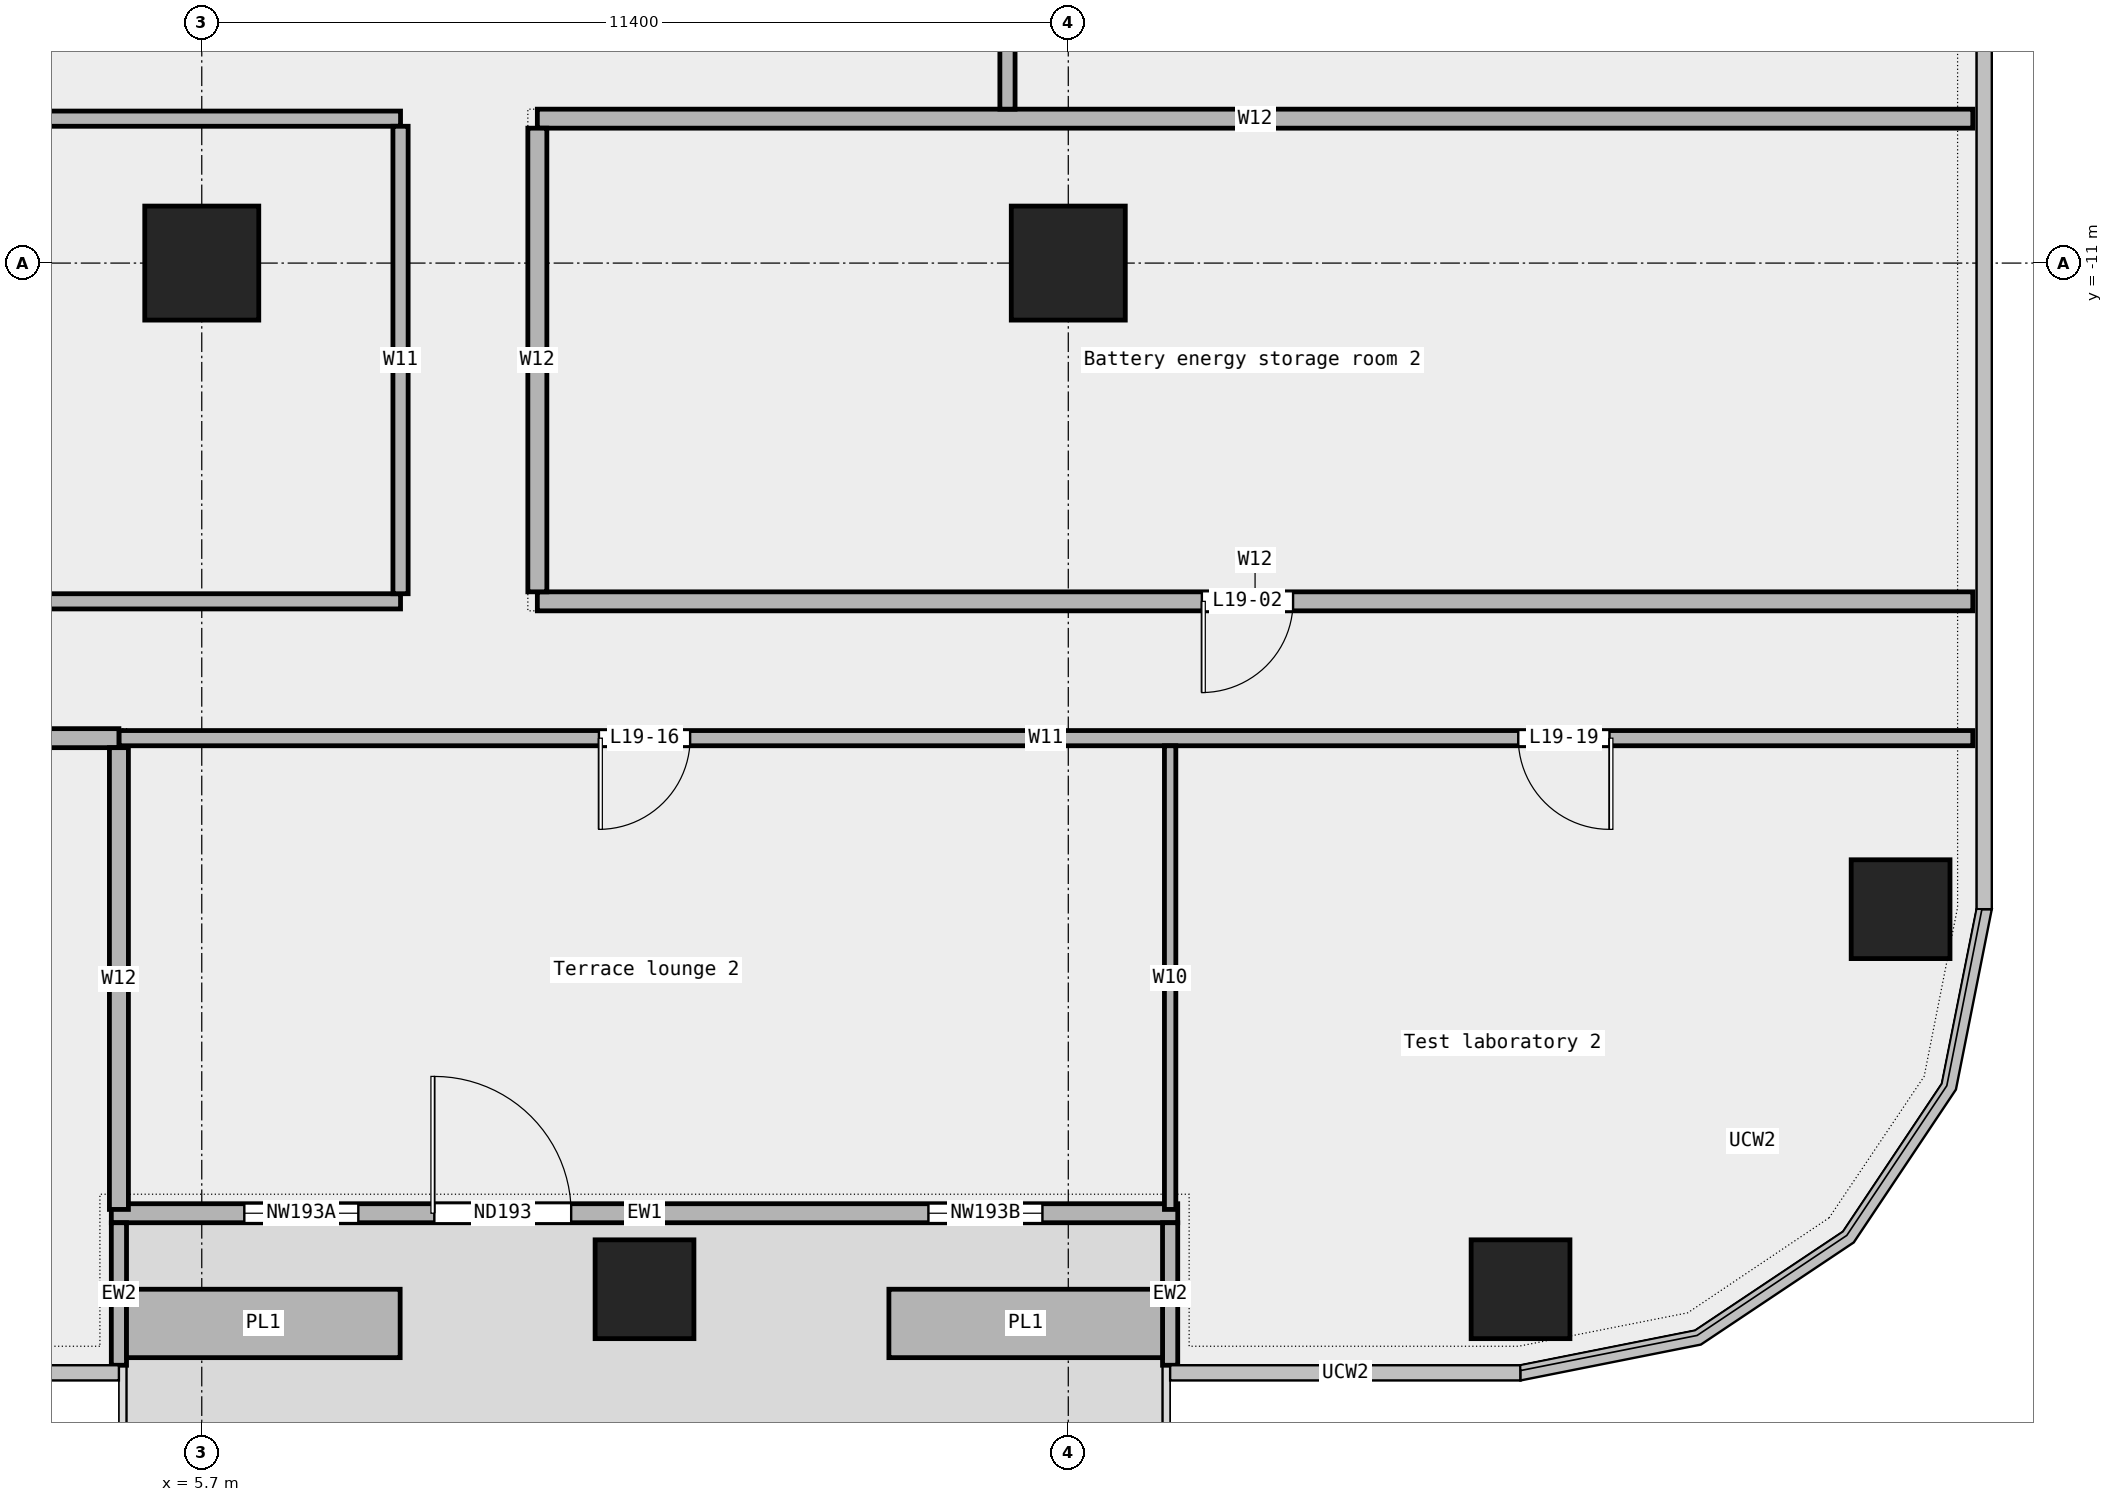
"""IFC4 building model, lengths in metres.
Left out: names, types, materials, properties, quantities, classifications, styles, units other than length and angle.
Written with IfcOpenShell. Run it as: python <this file> out.ifc"""

import sys

from ifc_helpers import new_model, si_unit, direction, frame, frame_2d, origin, origin_2d, place, context, subcontext, project, spatial, rectangle, extrude, element, fill, save


model = new_model("IFC4")
c1 = context("Model", 3, precision=1e-05, world=origin(), true_north=direction((0.0, 1.0)))
c2 = subcontext(c1, "Body", "Model", "MODEL_VIEW")
j1 = project(units=[si_unit("LENGTHUNIT", "METRE"), si_unit("PLANEANGLEUNIT", "RADIAN")], contexts=[c1])
p1 = place(None, origin())
s1 = spatial("IfcSite", under=j1, at=p1, CompositionType="ELEMENT")
p2 = place(p1, origin())
s2 = spatial("IfcBuilding", under=s1, at=p2, CompositionType="ELEMENT")
p3 = place(p2, frame((0.0, 0.0, 99.1)))
s3 = spatial("IfcBuildingStorey", under=s2, at=p3, CompositionType="ELEMENT", Elevation=99.1)
for number, where, z_axis, x_axis in (
    (1, (11.525, -24.5, 0.0), (0.0, 0.0, 1.0), (1.0, 0.0, 0.0)),
    (2, (23.05, -24.5, 0.0), (0.0, 0.0, 1.0), (1.0, 0.0, 0.0)),
    (3, (28.05, -19.5, 0.0), (0.0, 0.0, 1.0), (1.0, 0.0, 0.0)),
):
    element("IfcColumn", number, at=place(p3, frame(where, z_axis=z_axis, x_axis=x_axis)), inside=s3, PredefinedType="COLUMN", context=c2, shape_type="SweptSolid", body=[
        extrude(rectangle(XDim=1.3, YDim=1.3, at=origin_2d()), origin(), (0.0, 0.0, 1.0), 4.05),
    ])
for number, where, z_axis, x_axis in (
    (4, (5.7, -11.0, 0.0), (0.0, 0.0, 1.0), (1.0, 0.0, 0.0)),
    (5, (17.1, -11.0, 0.0), (0.0, 0.0, 1.0), (1.0, 0.0, 0.0)),
):
    element("IfcColumn", number, at=place(p3, frame(where, z_axis=z_axis, x_axis=x_axis)), inside=s3, PredefinedType="COLUMN", context=c2, shape_type="SweptSolid", body=[
        extrude(rectangle(XDim=1.5, YDim=1.5, at=origin_2d()), origin(), (0.0, 0.0, 1.0), 4.05),
    ])
p4 = place(p3, frame((4.51, -23.5, 0.0), z_axis=(0.0, 0.0, 1.0), x_axis=(1.0, 0.0, 0.0)))
e6 = element("IfcWall", 6, at=p4, inside=s3, PredefinedType="STANDARD", context=c2, shape_type="SweptSolid", body=[
    extrude(rectangle(XDim=14.03, YDim=0.25, at=frame_2d((7.015, 0.0))), origin(), (0.0, 0.0, 1.0), 4.05),
])
p5 = place(p4, frame((1.75, 0.0, 0.45)))
e7 = element("IfcOpeningElement", 7, at=p5, cuts=e6, PredefinedType="OPENING", context=c2, shape_type="SweptSolid", body=[
    extrude(rectangle(XDim=1.5, YDim=3.0, at=frame_2d((0.75, 1.5))), frame((0.0, 0.137, 0.0), z_axis=(0.0, -1.0, 0.0), x_axis=(1.0, 0.0, 0.0)), (0.0, 0.0, 1.0), 0.274),
])
p6 = place(p4, frame((4.25, 0.0, 0.0)))
e8 = element("IfcOpeningElement", 8, at=p6, cuts=e6, PredefinedType="OPENING", context=c2, shape_type="SweptSolid", body=[
    extrude(rectangle(XDim=1.8, YDim=2.4, at=frame_2d((0.9, 1.2))), frame((0.0, 0.137, 0.0), z_axis=(0.0, -1.0, 0.0), x_axis=(1.0, 0.0, 0.0)), (0.0, 0.0, 1.0), 0.274),
])
p7 = place(p4, frame((10.75, 0.0, 0.45)))
e9 = element("IfcOpeningElement", 9, at=p7, cuts=e6, PredefinedType="OPENING", context=c2, shape_type="SweptSolid", body=[
    extrude(rectangle(XDim=1.5, YDim=3.0, at=frame_2d((0.75, 1.5))), frame((0.0, 0.137, 0.0), z_axis=(0.0, -1.0, 0.0), x_axis=(1.0, 0.0, 0.0)), (0.0, 0.0, 1.0), 0.274),
])
for number, where, z_axis, x_axis in (
    (10, (4.61, -25.5, 0.0), (0.0, 0.0, 1.0), (0.0, 1.0, 0.0)),
    (11, (18.44, -25.5, 0.0), (0.0, 0.0, 1.0), (0.0, 1.0, 0.0)),
):
    element("IfcWall", number, at=place(p3, frame(where, z_axis=z_axis, x_axis=x_axis)), inside=s3, PredefinedType="STANDARD", context=c2, shape_type="SweptSolid", body=[
        extrude(rectangle(XDim=1.875, YDim=0.2, at=frame_2d((0.938, 0.0))), origin(), (0.0, 0.0, 1.0), 4.05),
    ])
for number, where, z_axis, x_axis in (
    (12, (4.71, -24.95, 0.0), (0.0, 0.0, 1.0), (1.0, 0.0, 0.0)),
    (13, (14.74, -24.95, 0.0), (0.0, 0.0, 1.0), (1.0, 0.0, 0.0)),
):
    element("IfcWall", number, at=place(p3, frame(where, z_axis=z_axis, x_axis=x_axis)), inside=s3, PredefinedType="STANDARD", context=c2, shape_type="SweptSolid", body=[
        extrude(rectangle(XDim=3.6, YDim=0.9, at=frame_2d((1.8, 0.0))), origin(), (0.0, 0.0, 1.0), 0.7),
    ])
p8 = place(p3, frame((4.61, -17.25, 0.0), z_axis=(0.0, 0.0, 1.0), x_axis=(1.0, 0.0, 0.0)))
e14 = element("IfcWall", 14, at=p8, inside=s3, PredefinedType="PARTITIONING", context=c2, shape_type="SweptSolid", body=[
    extrude(rectangle(XDim=24.39, YDim=0.2, at=frame_2d((12.195, 0.0))), origin(), (0.0, 0.0, 1.0), 4.05),
])
p9 = place(p8, frame((6.315, 0.0, 0.0)))
e15 = element("IfcOpeningElement", 15, at=p9, cuts=e14, PredefinedType="OPENING", context=c2, shape_type="SweptSolid", body=[
    extrude(rectangle(XDim=1.2, YDim=2.1, at=frame_2d((0.6, 1.05))), frame((0.0, 0.112, 0.0), z_axis=(0.0, -1.0, 0.0), x_axis=(1.0, 0.0, 0.0)), (0.0, 0.0, 1.0), 0.224),
])
p10 = place(p8, frame((18.41, 0.0, 0.0)))
e16 = element("IfcOpeningElement", 16, at=p10, cuts=e14, PredefinedType="OPENING", context=c2, shape_type="SweptSolid", body=[
    extrude(rectangle(XDim=1.2, YDim=2.1, at=frame_2d((0.6, 1.05))), frame((0.0, 0.112, 0.0), z_axis=(0.0, -1.0, 0.0), x_axis=(1.0, 0.0, 0.0)), (0.0, 0.0, 1.0), 0.224),
])
p11 = place(p3, frame((-29.0, -17.25, 0.0), z_axis=(0.0, 0.0, 1.0), x_axis=(1.0, 0.0, 0.0)))
e17 = element("IfcWall", 17, at=p11, inside=s3, PredefinedType="PARTITIONING", context=c2, shape_type="SweptSolid", body=[
    extrude(rectangle(XDim=33.61, YDim=0.25, at=frame_2d((16.805, 0.0))), origin(), (0.0, 0.0, 1.0), 4.05),
])
p12 = place(p11, frame((16.005, 0.0, 0.0)))
e18 = element("IfcOpeningElement", 18, at=p12, cuts=e17, PredefinedType="OPENING", context=c2, shape_type="SweptSolid", body=[
    extrude(rectangle(XDim=1.8, YDim=2.1, at=frame_2d((0.9, 1.05))), frame((0.0, 0.137, 0.0), z_axis=(0.0, -1.0, 0.0), x_axis=(1.0, 0.0, 0.0)), (0.0, 0.0, 1.0), 0.274),
])
p13 = place(p3, frame((-3.735, -15.45, 0.0), z_axis=(0.0, 0.0, 1.0), x_axis=(1.0, 0.0, 0.0)))
e19 = element("IfcWall", 19, at=p13, inside=s3, PredefinedType="PARTITIONING", context=c2, shape_type="SweptSolid", body=[
    extrude(rectangle(XDim=12.05, YDim=0.2, at=frame_2d((6.025, 0.0))), origin(), (0.0, 0.0, 1.0), 4.05),
])
p14 = place(p3, frame((10.115, -15.45, 0.0), z_axis=(0.0, 0.0, 1.0), x_axis=(1.0, 0.0, 0.0)))
e20 = element("IfcWall", 20, at=p14, inside=s3, PredefinedType="PARTITIONING", context=c2, shape_type="SweptSolid", body=[
    extrude(rectangle(XDim=18.885, YDim=0.25, at=frame_2d((9.442, 0.0))), origin(), (0.0, 0.0, 1.0), 4.05),
])
p15 = place(p14, frame((8.742, 0.0, 0.0)))
e21 = element("IfcOpeningElement", 21, at=p15, cuts=e20, PredefinedType="OPENING", context=c2, shape_type="SweptSolid", body=[
    extrude(rectangle(XDim=1.2, YDim=2.1, at=frame_2d((0.6, 1.05))), frame((0.0, 0.137, 0.0), z_axis=(0.0, -1.0, 0.0), x_axis=(1.0, 0.0, 0.0)), (0.0, 0.0, 1.0), 0.274),
])
p16 = place(p3, frame((-3.735, -9.1, 0.0), z_axis=(0.0, 0.0, 1.0), x_axis=(1.0, 0.0, 0.0)))
e22 = element("IfcWall", 22, at=p16, inside=s3, PredefinedType="PARTITIONING", context=c2, shape_type="SweptSolid", body=[
    extrude(rectangle(XDim=12.05, YDim=0.2, at=frame_2d((6.025, 0.0))), origin(), (0.0, 0.0, 1.0), 4.05),
])
p17 = place(p16, frame((5.425, 0.0, 0.0)))
e23 = element("IfcOpeningElement", 23, at=p17, cuts=e22, PredefinedType="OPENING", context=c2, shape_type="SweptSolid", body=[
    extrude(rectangle(XDim=1.2, YDim=2.1, at=frame_2d((0.6, 1.05))), frame((0.0, 0.112, 0.0), z_axis=(0.0, -1.0, 0.0), x_axis=(1.0, 0.0, 0.0)), (0.0, 0.0, 1.0), 0.224),
])
p18 = place(p3, frame((10.115, -9.1, 0.0), z_axis=(0.0, 0.0, 1.0), x_axis=(1.0, 0.0, 0.0)))
e24 = element("IfcWall", 24, at=p18, inside=s3, PredefinedType="PARTITIONING", context=c2, shape_type="SweptSolid", body=[
    extrude(rectangle(XDim=18.885, YDim=0.25, at=frame_2d((9.442, 0.0))), origin(), (0.0, 0.0, 1.0), 4.05),
])
p19 = place(p3, frame((4.61, -23.45, 0.0), z_axis=(0.0, 0.0, 1.0), x_axis=(0.0, 1.0, 0.0)))
e25 = element("IfcWall", 25, at=p19, inside=s3, PredefinedType="PARTITIONING", context=c2, shape_type="SweptSolid", body=[
    extrude(rectangle(XDim=6.075, YDim=0.25, at=frame_2d((3.038, 0.0))), origin(), (0.0, 0.0, 1.0), 4.05),
])
p20 = place(p3, frame((8.315, -15.35, 0.0), z_axis=(0.0, 0.0, 1.0), x_axis=(0.0, 1.0, 0.0)))
e26 = element("IfcWall", 26, at=p20, inside=s3, PredefinedType="PARTITIONING", context=c2, shape_type="SweptSolid", body=[
    extrude(rectangle(XDim=6.15, YDim=0.2, at=frame_2d((3.075, 0.0))), origin(), (0.0, 0.0, 1.0), 4.05),
])
p21 = place(p3, frame((10.115, -15.325, 0.0), z_axis=(0.0, 0.0, 1.0), x_axis=(0.0, 1.0, 0.0)))
e27 = element("IfcWall", 27, at=p21, inside=s3, PredefinedType="PARTITIONING", context=c2, shape_type="SweptSolid", body=[
    extrude(rectangle(XDim=6.1, YDim=0.25, at=frame_2d((3.05, 0.0))), origin(), (0.0, 0.0, 1.0), 4.05),
])
p22 = place(p3, frame((16.3, -8.975, 0.0), z_axis=(0.0, 0.0, 1.0), x_axis=(0.0, 1.0, 0.0)))
e28 = element("IfcWall", 28, at=p22, inside=s3, PredefinedType="PARTITIONING", context=c2, shape_type="SweptSolid", body=[
    extrude(rectangle(XDim=8.225, YDim=0.2, at=frame_2d((4.113, 0.0))), origin(), (0.0, 0.0, 1.0), 4.05),
])
p23 = place(p22, frame((3.363, 0.0, 0.0)))
e29 = element("IfcOpeningElement", 29, at=p23, cuts=e28, PredefinedType="OPENING", context=c2, shape_type="SweptSolid", body=[
    extrude(rectangle(XDim=1.5, YDim=2.1, at=frame_2d((0.75, 1.05))), frame((0.0, 0.112, 0.0), z_axis=(0.0, -1.0, 0.0), x_axis=(1.0, 0.0, 0.0)), (0.0, 0.0, 1.0), 0.224),
])
p24 = place(p3, frame((18.44, -23.45, 0.0), z_axis=(0.0, 0.0, 1.0), x_axis=(0.0, 1.0, 0.0)))
e30 = element("IfcWall", 30, at=p24, inside=s3, PredefinedType="PARTITIONING", context=c2, shape_type="SweptSolid", body=[
    extrude(rectangle(XDim=6.1, YDim=0.15, at=frame_2d((3.05, 0.0))), origin(), (0.0, 0.0, 1.0), 4.05),
])
p25 = place(p5, origin())
e31 = element("IfcWindow", 31, at=p25, inside=s3, PartitioningType="SINGLE_PANEL", PredefinedType="WINDOW", context=c2, shape_type="SweptSolid", body=[
    extrude(rectangle(XDim=1.5, YDim=3.0, at=frame_2d((0.75, 1.5))), frame((0.0, 0.03, 0.0), z_axis=(0.0, -1.0, 0.0), x_axis=(1.0, 0.0, 0.0)), (0.0, 0.0, 1.0), 0.06),
])
fill(e7, e31)
p26 = place(p6, origin())
e32 = element("IfcDoor", 32, at=p26, inside=s3, OperationType="DOUBLE_DOOR_SINGLE_SWING", PredefinedType="DOOR", context=c2, shape_type="SweptSolid", body=[
    extrude(rectangle(XDim=1.8, YDim=2.4, at=frame_2d((0.9, 1.2))), frame((0.0, 0.025, 0.0), z_axis=(0.0, -1.0, 0.0), x_axis=(1.0, 0.0, 0.0)), (0.0, 0.0, 1.0), 0.05),
])
fill(e8, e32)
p27 = place(p7, origin())
e33 = element("IfcWindow", 33, at=p27, inside=s3, PartitioningType="SINGLE_PANEL", PredefinedType="WINDOW", context=c2, shape_type="SweptSolid", body=[
    extrude(rectangle(XDim=1.5, YDim=3.0, at=frame_2d((0.75, 1.5))), frame((0.0, 0.03, 0.0), z_axis=(0.0, -1.0, 0.0), x_axis=(1.0, 0.0, 0.0)), (0.0, 0.0, 1.0), 0.06),
])
fill(e9, e33)
p28 = place(p15, origin())
e34 = element("IfcDoor", 34, at=p28, inside=s3, OperationType="SINGLE_SWING_RIGHT", PredefinedType="DOOR", context=c2, shape_type="SweptSolid", body=[
    extrude(rectangle(XDim=1.2, YDim=2.1, at=frame_2d((0.6, 1.05))), frame((0.0, 0.025, 0.0), z_axis=(0.0, -1.0, 0.0), x_axis=(1.0, 0.0, 0.0)), (0.0, 0.0, 1.0), 0.05),
])
fill(e21, e34)
p29 = place(p9, origin())
e35 = element("IfcDoor", 35, at=p29, inside=s3, OperationType="SINGLE_SWING_RIGHT", PredefinedType="DOOR", context=c2, shape_type="SweptSolid", body=[
    extrude(rectangle(XDim=1.2, YDim=2.1, at=frame_2d((0.6, 1.05))), frame((0.0, 0.025, 0.0), z_axis=(0.0, -1.0, 0.0), x_axis=(1.0, 0.0, 0.0)), (0.0, 0.0, 1.0), 0.05),
])
fill(e15, e35)
p30 = place(p10, origin())
e36 = element("IfcDoor", 36, at=p30, inside=s3, OperationType="SINGLE_SWING_LEFT", PredefinedType="DOOR", context=c2, shape_type="SweptSolid", body=[
    extrude(rectangle(XDim=1.2, YDim=2.1, at=frame_2d((0.6, 1.05))), frame((0.0, 0.025, 0.0), z_axis=(0.0, -1.0, 0.0), x_axis=(1.0, 0.0, 0.0)), (0.0, 0.0, 1.0), 0.05),
])
fill(e16, e36)
save(model, sys.argv[1])
